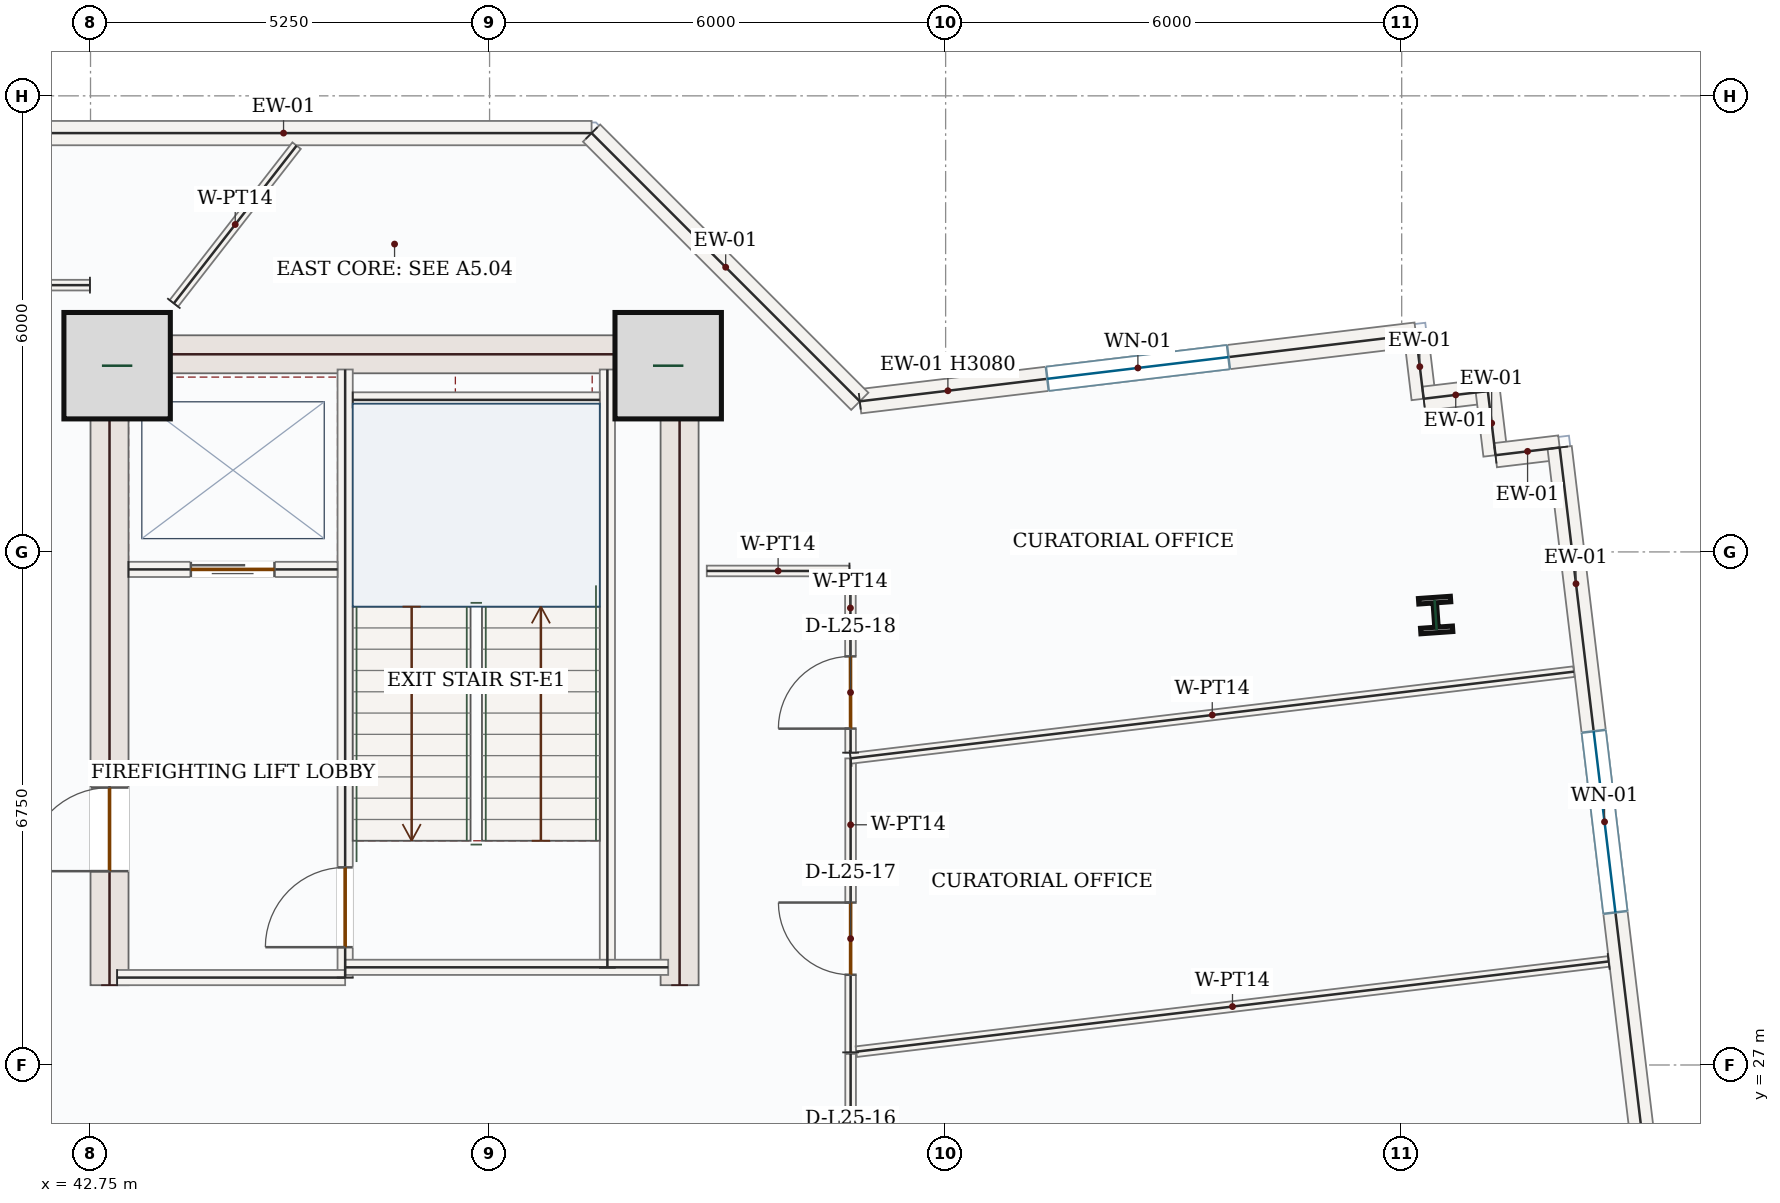
"""IFC4 building model, lengths in metres.
Left out: names, types, materials, properties, quantities, classifications, styles, units other than length and angle.
Written with IfcOpenShell. Run it as: python <this file> out.ifc"""

import sys

from ifc_helpers import new_model, si_unit, direction, frame, frame_2d, origin, origin_2d, place, context, subcontext, project, spatial, rectangle, i_section, extrude, source, transform, mapped, element, fill, save


model = new_model("IFC4")
c1 = context("Model", 3, precision=1e-05, world=origin(), true_north=direction((0.0, 1.0)))
c2 = subcontext(c1, "Body", "Model", "MODEL_VIEW")
j1 = project(units=[si_unit("LENGTHUNIT", "METRE"), si_unit("PLANEANGLEUNIT", "RADIAN")], contexts=[c1])
p1 = place(None, origin())
s1 = spatial("IfcSite", under=j1, at=p1, CompositionType="ELEMENT")
p2 = place(p1, origin())
s2 = spatial("IfcBuilding", under=s1, at=p2, CompositionType="ELEMENT")
p3 = place(p2, frame((0.0, 0.0, 113.1)))
s3 = spatial("IfcBuildingStorey", under=s2, at=p3, CompositionType="ELEMENT", Elevation=113.1)
p4 = place(p3, frame((43.0, 28.05, 0.0), z_axis=(0.0, 0.0, 1.0), x_axis=(0.0, 1.0, 0.0)))
e1 = element("IfcWall", 1, at=p4, inside=s3, PredefinedType="SHEAR", context=c2, shape_type="SweptSolid", body=[
    extrude(rectangle(XDim=8.55, YDim=0.5, at=frame_2d((4.275, 0.0))), origin(), (0.0, 0.0, 1.0), 3.95),
])
p5 = place(p4, frame((1.5, 0.0, 0.0)))
e2 = element("IfcOpeningElement", 2, at=p5, cuts=e1, PredefinedType="OPENING", context=c2, shape_type="SweptSolid", body=[
    extrude(rectangle(XDim=1.1, YDim=2.2, at=frame_2d((0.55, 1.1))), frame((0.0, 0.26, 0.0), z_axis=(0.0, -1.0, 0.0), x_axis=(1.0, 0.0, 0.0)), (0.0, 0.0, 1.0), 0.52),
])
m1 = source(origin(), c2, "Body", "SweptSolid", [
    extrude(rectangle(XDim=8.55, YDim=0.5, at=frame_2d((4.275, 0.0))), origin(), (0.0, 0.0, 1.0), 3.95),
])
p6 = place(p3, frame((50.5, 28.05, 0.0), z_axis=(0.0, 0.0, 1.0), x_axis=(0.0, 1.0, 0.0)))
e3 = element("IfcWall", 3, at=p6, inside=s3, PredefinedType="SHEAR", context=c2, shape_type="MappedRepresentation", body=[
    mapped(m1, transform((0.0, 0.0, 0.0), x_axis=(1.0, 0.0, 0.0), y_axis=(0.0, 1.0, 0.0), z_axis=(0.0, 0.0, 1.0), scale=1.0)),
])
m2 = source(origin(), c2, "Body", "SweptSolid", [
    extrude(rectangle(XDim=7.0, YDim=0.5, at=frame_2d((3.5, 0.0))), origin(), (0.0, 0.0, 1.0), 3.95),
])
p7 = place(p3, frame((43.25, 36.35, 0.0), z_axis=(0.0, 0.0, 1.0), x_axis=(1.0, 0.0, 0.0)))
e4 = element("IfcWall", 4, at=p7, inside=s3, PredefinedType="SHEAR", context=c2, shape_type="MappedRepresentation", body=[
    mapped(m2, transform((0.0, 0.0, 0.0), x_axis=(1.0, 0.0, 0.0), y_axis=(0.0, 1.0, 0.0), z_axis=(0.0, 0.0, 1.0), scale=1.0)),
])
m3 = source(origin(), c2, "Body", "SweptSolid", [
    extrude(rectangle(XDim=1.4, YDim=1.4, at=origin_2d()), origin(), (0.0, 0.0, 1.0), 4.2),
])
for number, where, z_axis, x_axis in (
    (5, (43.1, 36.2, 0.0), (0.0, 0.0, 1.0), (1.0, 0.0, 0.0)),
    (6, (50.35, 36.2, 0.0), (0.0, 0.0, 1.0), (1.0, 0.0, 0.0)),
):
    element("IfcColumn", number, at=place(p3, frame(where, z_axis=z_axis, x_axis=x_axis)), inside=s3, PredefinedType="COLUMN", context=c2, shape_type="MappedRepresentation", body=[
        mapped(m3, transform((0.0, 0.0, 0.0), x_axis=(1.0, 0.0, 0.0), y_axis=(0.0, 1.0, 0.0), z_axis=(0.0, 0.0, 1.0), scale=1.0)),
    ])
m4 = source(origin(), c2, "Body", "SweptSolid", [
    extrude(i_section(OverallWidth=0.421, OverallDepth=0.465, WebThickness=0.045, FlangeThickness=0.073, FilletRadius=0.018, at=origin_2d()), origin(), (0.0, 0.0, 1.0), 4.2),
])
p8 = place(p3, frame((60.447, 32.92, 0.0), z_axis=(0.0, 0.0, 1.0), x_axis=(0.99756405026, 0.069756473744, 0.0)))
e7 = element("IfcColumn", 7, at=p8, inside=s3, PredefinedType="COLUMN", context=c2, shape_type="MappedRepresentation", body=[
    mapped(m4, transform((0.0, 0.0, 0.0), x_axis=(1.0, 0.0, 0.0), y_axis=(0.0, 1.0, 0.0), z_axis=(0.0, 0.0, 1.0), scale=1.0)),
])
p9 = place(p3, frame((52.871, 35.731, 0.0), z_axis=(0.0, 0.0, 1.0), x_axis=(0.992882794037, 0.119095580547, 0.0)))
e8 = element("IfcWall", 8, at=p9, inside=s3, PredefinedType="SOLIDWALL", context=c2, shape_type="SweptSolid", body=[
    extrude(rectangle(XDim=7.37, YDim=0.32, at=frame_2d((3.685, 0.0))), origin(), (0.0, 0.0, 1.0), 3.08),
])
p10 = place(p9, frame((2.485, 0.0, 0.85)))
e9 = element("IfcOpeningElement", 9, at=p10, cuts=e8, PredefinedType="OPENING", context=c2, shape_type="SweptSolid", body=[
    extrude(rectangle(XDim=2.4, YDim=1.8, at=frame_2d((1.2, 0.9))), frame((0.0, 0.17, 0.0), z_axis=(0.0, -1.0, 0.0), x_axis=(1.0, 0.0, 0.0)), (0.0, 0.0, 1.0), 0.34),
])
m5 = source(origin(), c2, "Body", "SweptSolid", [
    extrude(rectangle(XDim=0.85, YDim=0.32, at=frame_2d((0.425, 0.0))), origin(), (0.0, 0.0, 1.0), 3.95),
])
for number, where, z_axis, x_axis in (
    (10, (60.188, 36.609, 0.0), (0.0, 0.0, 1.0), (0.119, -0.993, 0.0)),
    (11, (60.289, 35.765, 0.0), (0.0, 0.0, 1.0), (0.993, 0.119, 0.0)),
):
    element("IfcWall", number, at=place(p3, frame(where, z_axis=z_axis, x_axis=x_axis)), inside=s3, PredefinedType="SOLIDWALL", context=c2, shape_type="MappedRepresentation", body=[
        mapped(m5, transform((0.0, 0.0, 0.0), x_axis=(1.0, 0.0, 0.0), y_axis=(0.0, 1.0, 0.0), z_axis=(0.0, 0.0, 1.0), scale=1.0)),
    ])
m6 = source(origin(), c2, "Body", "SweptSolid", [
    extrude(rectangle(XDim=0.85, YDim=0.32, at=frame_2d((0.425, 0.0))), origin(), (0.0, 0.0, 1.0), 3.95),
])
p11 = place(p3, frame((61.133, 35.866, 0.0), z_axis=(0.0, 0.0, 1.0), x_axis=(0.11894130009, -0.992901287708, 0.0)))
e12 = element("IfcWall", 12, at=p11, inside=s3, PredefinedType="SOLIDWALL", context=c2, shape_type="MappedRepresentation", body=[
    mapped(m6, transform((0.0, 0.0, 0.0), x_axis=(1.0, 0.0, 0.0), y_axis=(0.0, 1.0, 0.0), z_axis=(0.0, 0.0, 1.0), scale=1.0)),
])
p12 = place(p3, frame((61.234, 35.022, 0.0), z_axis=(0.0, 0.0, 1.0), x_axis=(0.992905350382, 0.118907380694, 0.0)))
e13 = element("IfcWall", 13, at=p12, inside=s3, PredefinedType="SOLIDWALL", context=c2, shape_type="MappedRepresentation", body=[
    mapped(m5, transform((0.0, 0.0, 0.0), x_axis=(1.0, 0.0, 0.0), y_axis=(0.0, 1.0, 0.0), z_axis=(0.0, 0.0, 1.0), scale=1.0)),
])
p13 = place(p3, frame((62.078, 35.124, 0.0), z_axis=(0.0, 0.0, 1.0), x_axis=(0.119092815244, -0.992883125729, 0.0)))
e14 = element("IfcWall", 14, at=p13, inside=s3, PredefinedType="SOLIDWALL", context=c2, shape_type="SweptSolid", body=[
    extrude(rectangle(XDim=9.92, YDim=0.32, at=frame_2d((4.96, 0.0))), origin(), (0.0, 0.0, 1.0), 3.95),
])
p14 = place(p13, frame((3.76, 0.0, 0.85)))
e15 = element("IfcOpeningElement", 15, at=p14, cuts=e14, PredefinedType="OPENING", context=c2, shape_type="SweptSolid", body=[
    extrude(rectangle(XDim=2.4, YDim=1.8, at=frame_2d((1.2, 0.9))), frame((0.0, 0.17, 0.0), z_axis=(0.0, -1.0, 0.0), x_axis=(1.0, 0.0, 0.0)), (0.0, 0.0, 1.0), 0.34),
])
m7 = source(origin(), c2, "Body", "SweptSolid", [
    extrude(rectangle(XDim=8.105, YDim=0.32, at=frame_2d((4.052, 0.0))), origin(), (0.0, 0.0, 1.0), 3.95),
])
p15 = place(p3, frame((41.237, 39.26, 0.0), z_axis=(0.0, 0.0, 1.0), x_axis=(1.0, 0.0, 0.0)))
e16 = element("IfcWall", 16, at=p15, inside=s3, PredefinedType="SOLIDWALL", context=c2, shape_type="MappedRepresentation", body=[
    mapped(m7, transform((0.0, 0.0, 0.0), x_axis=(1.0, 0.0, 0.0), y_axis=(0.0, 1.0, 0.0), z_axis=(0.0, 0.0, 1.0), scale=1.0)),
])
m8 = source(origin(), c2, "Body", "SweptSolid", [
    extrude(rectangle(XDim=4.99, YDim=0.32, at=frame_2d((2.495, 0.0))), origin(), (0.0, 0.0, 1.0), 3.95),
])
p16 = place(p3, frame((49.342, 39.26, 0.0), z_axis=(0.0, 0.0, 1.0), x_axis=(0.707106781187, -0.707106781187, 0.0)))
e17 = element("IfcWall", 17, at=p16, inside=s3, PredefinedType="SOLIDWALL", context=c2, shape_type="MappedRepresentation", body=[
    mapped(m8, transform((0.0, 0.0, 0.0), x_axis=(1.0, 0.0, 0.0), y_axis=(0.0, 1.0, 0.0), z_axis=(0.0, 0.0, 1.0), scale=1.0)),
])
m9 = source(origin(), c2, "Body", "SweptSolid", [
    extrude(rectangle(XDim=7.87, YDim=0.2, at=frame_2d((3.935, 0.0))), origin(), (0.0, 0.0, 1.0), 3.95),
])
p17 = place(p3, frame((49.55, 28.28, 0.0), z_axis=(0.0, 0.0, 1.0), x_axis=(0.0, 1.0, 0.0)))
e18 = element("IfcWall", 18, at=p17, inside=s3, PredefinedType="SOLIDWALL", context=c2, shape_type="MappedRepresentation", body=[
    mapped(m9, transform((0.0, 0.0, 0.0), x_axis=(1.0, 0.0, 0.0), y_axis=(0.0, 1.0, 0.0), z_axis=(0.0, 0.0, 1.0), scale=1.0)),
])
p18 = place(p3, frame((46.1, 28.15, 0.0), z_axis=(0.0, 0.0, 1.0), x_axis=(0.0, 1.0, 0.0)))
e19 = element("IfcWall", 19, at=p18, inside=s3, PredefinedType="SOLIDWALL", context=c2, shape_type="SweptSolid", body=[
    extrude(rectangle(XDim=8.0, YDim=0.2, at=frame_2d((4.0, 0.0))), origin(), (0.0, 0.0, 1.0), 3.95),
])
p19 = place(p18, frame((0.4, 0.0, 0.0)))
e20 = element("IfcOpeningElement", 20, at=p19, cuts=e19, PredefinedType="OPENING", context=c2, shape_type="SweptSolid", body=[
    extrude(rectangle(XDim=1.05, YDim=2.15, at=frame_2d((0.525, 1.075))), frame((0.0, 0.11, 0.0), z_axis=(0.0, -1.0, 0.0), x_axis=(1.0, 0.0, 0.0)), (0.0, 0.0, 1.0), 0.22),
])
m10 = source(origin(), c2, "Body", "SweptSolid", [
    extrude(rectangle(XDim=3.0, YDim=0.2, at=frame_2d((1.5, 0.0))), origin(), (0.0, 0.0, 1.0), 3.95),
])
p20 = place(p3, frame((43.1, 28.15, 0.0), z_axis=(0.0, 0.0, 1.0), x_axis=(1.0, 0.0, 0.0)))
e21 = element("IfcWall", 21, at=p20, inside=s3, PredefinedType="SOLIDWALL", context=c2, shape_type="MappedRepresentation", body=[
    mapped(m10, transform((0.0, 0.0, 0.0), x_axis=(1.0, 0.0, 0.0), y_axis=(0.0, 1.0, 0.0), z_axis=(0.0, 0.0, 1.0), scale=1.0)),
])
m11 = source(origin(), c2, "Body", "SweptSolid", [
    extrude(rectangle(XDim=4.25, YDim=0.2, at=frame_2d((2.125, 0.0))), origin(), (0.0, 0.0, 1.0), 3.95),
])
p21 = place(p3, frame((46.1, 28.285, 0.0), z_axis=(0.0, 0.0, 1.0), x_axis=(1.0, 0.0, 0.0)))
e22 = element("IfcWall", 22, at=p21, inside=s3, PredefinedType="SOLIDWALL", context=c2, shape_type="MappedRepresentation", body=[
    mapped(m11, transform((0.0, 0.0, 0.0), x_axis=(1.0, 0.0, 0.0), y_axis=(0.0, 1.0, 0.0), z_axis=(0.0, 0.0, 1.0), scale=1.0)),
])
m12 = source(origin(), c2, "Body", "SweptSolid", [
    extrude(rectangle(XDim=3.25, YDim=0.2, at=frame_2d((1.625, 0.0))), origin(), (0.0, 0.0, 1.0), 3.95),
])
p22 = place(p3, frame((46.2, 35.75, 0.0), z_axis=(0.0, 0.0, 1.0), x_axis=(1.0, 0.0, 0.0)))
e23 = element("IfcWall", 23, at=p22, inside=s3, PredefinedType="SOLIDWALL", context=c2, shape_type="MappedRepresentation", body=[
    mapped(m12, transform((0.0, 0.0, 0.0), x_axis=(1.0, 0.0, 0.0), y_axis=(0.0, 1.0, 0.0), z_axis=(0.0, 0.0, 1.0), scale=1.0)),
])
p23 = place(p3, frame((43.25, 33.52, 0.0), z_axis=(0.0, 0.0, 1.0), x_axis=(1.0, 0.0, 0.0)))
e24 = element("IfcWall", 24, at=p23, inside=s3, PredefinedType="SOLIDWALL", context=c2, shape_type="SweptSolid", body=[
    extrude(rectangle(XDim=2.75, YDim=0.2, at=frame_2d((1.375, 0.0))), origin(), (0.0, 0.0, 1.0), 3.95),
])
p24 = place(p23, frame((0.82, 0.0, 0.0)))
e25 = element("IfcOpeningElement", 25, at=p24, cuts=e24, PredefinedType="OPENING", context=c2, shape_type="SweptSolid", body=[
    extrude(rectangle(XDim=1.1, YDim=2.15, at=frame_2d((0.55, 1.075))), frame((0.0, 0.11, 0.0), z_axis=(0.0, -1.0, 0.0), x_axis=(1.0, 0.0, 0.0)), (0.0, 0.0, 1.0), 0.22),
])
p25 = place(p3, frame((52.75, 27.166, 0.0), z_axis=(0.0, 0.0, 1.0), x_axis=(0.0, 1.0, 0.0)))
e26 = element("IfcWall", 26, at=p25, inside=s3, PredefinedType="PARTITIONING", context=c2, shape_type="SweptSolid", body=[
    extrude(rectangle(XDim=3.868, YDim=0.14, at=frame_2d((1.934, 0.0))), origin(), (0.0, 0.0, 1.0), 3.95),
])
p26 = place(p25, frame((1.021, 0.0, 0.0)))
e27 = element("IfcOpeningElement", 27, at=p26, cuts=e26, PredefinedType="OPENING", context=c2, shape_type="SweptSolid", body=[
    extrude(rectangle(XDim=0.95, YDim=2.15, at=frame_2d((0.475, 1.075))), frame((0.0, 0.08, 0.0), z_axis=(0.0, -1.0, 0.0), x_axis=(1.0, 0.0, 0.0)), (0.0, 0.0, 1.0), 0.16),
])
m13 = source(origin(), c2, "Body", "SweptSolid", [
    extrude(rectangle(XDim=9.584, YDim=0.14, at=frame_2d((4.792, 0.0))), origin(), (0.0, 0.0, 1.0), 3.95),
])
p27 = place(p3, frame((52.75, 31.034, 0.0), z_axis=(0.0, 0.0, 1.0), x_axis=(0.992883225705, 0.119091981737, 0.0)))
e28 = element("IfcWall", 28, at=p27, inside=s3, PredefinedType="PARTITIONING", context=c2, shape_type="MappedRepresentation", body=[
    mapped(m13, transform((0.0, 0.0, 0.0), x_axis=(1.0, 0.0, 0.0), y_axis=(0.0, 1.0, 0.0), z_axis=(0.0, 0.0, 1.0), scale=1.0)),
])
m14 = source(origin(), c2, "Body", "SweptSolid", [
    extrude(rectangle(XDim=9.969, YDim=0.14, at=frame_2d((4.984, 0.0))), origin(), (0.0, 0.0, 1.0), 3.95),
])
p28 = place(p3, frame((62.723, 28.362, 0.0), z_axis=(0.0, 0.0, 1.0), x_axis=(-0.992882747367, -0.119095969623, 0.0)))
e29 = element("IfcWall", 29, at=p28, inside=s3, PredefinedType="PARTITIONING", context=c2, shape_type="MappedRepresentation", body=[
    mapped(m14, transform((0.0, 0.0, 0.0), x_axis=(1.0, 0.0, 0.0), y_axis=(0.0, 1.0, 0.0), z_axis=(0.0, 0.0, 1.0), scale=1.0)),
])
p29 = place(p3, frame((52.75, 20.575, 0.0), z_axis=(0.0, 0.0, 1.0), x_axis=(0.0, 1.0, 0.0)))
e30 = element("IfcWall", 30, at=p29, inside=s3, PredefinedType="PARTITIONING", context=c2, shape_type="SweptSolid", body=[
    extrude(rectangle(XDim=6.571, YDim=0.14, at=frame_2d((3.285, 0.0))), origin(), (0.0, 0.0, 1.0), 3.95),
])
p30 = place(p29, frame((4.384, 0.0, 0.0)))
e31 = element("IfcOpeningElement", 31, at=p30, cuts=e30, PredefinedType="OPENING", context=c2, shape_type="SweptSolid", body=[
    extrude(rectangle(XDim=0.95, YDim=2.15, at=frame_2d((0.475, 1.075))), frame((0.0, 0.08, 0.0), z_axis=(0.0, -1.0, 0.0), x_axis=(1.0, 0.0, 0.0)), (0.0, 0.0, 1.0), 0.16),
])
m15 = source(origin(), c2, "Body", "SweptSolid", [
    extrude(rectangle(XDim=2.629, YDim=0.14, at=frame_2d((1.315, 0.0))), origin(), (0.0, 0.0, 1.0), 3.95),
])
p31 = place(p3, frame((43.846, 37.02, 0.0), z_axis=(0.0, 0.0, 1.0), x_axis=(0.614210560268, 0.789142184689, 0.0)))
e32 = element("IfcWall", 32, at=p31, inside=s3, PredefinedType="PARTITIONING", context=c2, shape_type="MappedRepresentation", body=[
    mapped(m15, transform((0.0, 0.0, 0.0), x_axis=(1.0, 0.0, 0.0), y_axis=(0.0, 1.0, 0.0), z_axis=(0.0, 0.0, 1.0), scale=1.0)),
])
p32 = place(p3, frame((52.75, 31.109, 0.0), z_axis=(0.0, 0.0, 1.0), x_axis=(-0.001430175266, 0.999998977299, 0.0)))
e33 = element("IfcWall", 33, at=p32, inside=s3, PredefinedType="PARTITIONING", context=c2, shape_type="SweptSolid", body=[
    extrude(rectangle(XDim=2.39, YDim=0.14, at=frame_2d((1.195, 0.0))), origin(), (0.0, 0.0, 1.0), 3.95),
])
p33 = place(p32, frame((0.317, 0.0, 0.0)))
e34 = element("IfcOpeningElement", 34, at=p33, cuts=e33, PredefinedType="OPENING", context=c2, shape_type="SweptSolid", body=[
    extrude(rectangle(XDim=0.95, YDim=2.15, at=frame_2d((0.475, 1.075))), frame((0.0, 0.08, 0.0), z_axis=(0.0, -1.0, 0.0), x_axis=(1.0, 0.0, 0.0)), (0.0, 0.0, 1.0), 0.16),
])
m16 = source(origin(), c2, "Body", "SweptSolid", [
    extrude(rectangle(XDim=1.877, YDim=0.14, at=frame_2d((0.938, 0.0))), origin(), (0.0, 0.0, 1.0), 3.95),
])
p34 = place(p3, frame((52.735, 33.499, 0.0), z_axis=(0.0, 0.0, 1.0), x_axis=(-0.999999923865, 0.000390218493, 0.0)))
e35 = element("IfcWall", 35, at=p34, inside=s3, PredefinedType="PARTITIONING", context=c2, shape_type="MappedRepresentation", body=[
    mapped(m16, transform((0.0, 0.0, 0.0), x_axis=(1.0, 0.0, 0.0), y_axis=(0.0, 1.0, 0.0), z_axis=(0.0, 0.0, 1.0), scale=1.0)),
])
p35 = place(p3, frame((42.742, 37.26, 0.0), z_axis=(0.0, 0.0, 1.0), x_axis=(-0.999999999614, 2.7778549e-05, 0.0)))
e36 = element("IfcWall", 36, at=p35, inside=s3, PredefinedType="PARTITIONING", context=c2, shape_type="SweptSolid", body=[
    extrude(rectangle(XDim=8.789, YDim=0.14, at=frame_2d((4.395, 0.0))), origin(), (0.0, 0.0, 1.0), 3.95),
])
p36 = place(p35, frame((6.114, 0.0, 0.0)))
e37 = element("IfcOpeningElement", 37, at=p36, cuts=e36, PredefinedType="OPENING", context=c2, shape_type="SweptSolid", body=[
    extrude(rectangle(XDim=0.95, YDim=2.15, at=frame_2d((0.475, 1.075))), frame((0.0, 0.08, 0.0), z_axis=(0.0, -1.0, 0.0), x_axis=(1.0, 0.0, 0.0)), (0.0, 0.0, 1.0), 0.16),
])
m17 = source(origin(), c2, "Body", "SweptSolid", [
    extrude(rectangle(XDim=2.4, YDim=1.8, at=frame_2d((1.2, 0.9))), frame((0.0, 0.03, 0.0), z_axis=(0.0, -1.0, 0.0), x_axis=(1.0, 0.0, 0.0)), (0.0, 0.0, 1.0), 0.06),
])
p37 = place(p10, origin())
e38 = element("IfcWindow", 38, at=p37, inside=s3, PartitioningType="DOUBLE_PANEL_VERTICAL", PredefinedType="WINDOW", context=c2, shape_type="MappedRepresentation", body=[
    mapped(m17, transform((0.0, 0.0, 0.0), x_axis=(1.0, 0.0, 0.0), y_axis=(0.0, 1.0, 0.0), z_axis=(0.0, 0.0, 1.0), scale=1.0)),
])
fill(e9, e38)
p38 = place(p14, origin())
e39 = element("IfcWindow", 39, at=p38, inside=s3, PartitioningType="DOUBLE_PANEL_VERTICAL", PredefinedType="WINDOW", context=c2, shape_type="MappedRepresentation", body=[
    mapped(m17, transform((0.0, 0.0, 0.0), x_axis=(1.0, 0.0, 0.0), y_axis=(0.0, 1.0, 0.0), z_axis=(0.0, 0.0, 1.0), scale=1.0)),
])
fill(e15, e39)
m18 = source(origin(), c2, "Body", "SweptSolid", [
    extrude(rectangle(XDim=1.05, YDim=2.15, at=frame_2d((0.525, 1.075))), frame((0.0, 0.025, 0.0), z_axis=(0.0, -1.0, 0.0), x_axis=(1.0, 0.0, 0.0)), (0.0, 0.0, 1.0), 0.05),
])
p39 = place(p19, origin())
e40 = element("IfcDoor", 40, at=p39, inside=s3, OperationType="SINGLE_SWING_LEFT", PredefinedType="DOOR", context=c2, shape_type="MappedRepresentation", body=[
    mapped(m18, transform((0.0, 0.0, 0.0), x_axis=(1.0, 0.0, 0.0), y_axis=(0.0, 1.0, 0.0), z_axis=(0.0, 0.0, 1.0), scale=1.0)),
])
fill(e20, e40)
m19 = source(origin(), c2, "Body", "SweptSolid", [
    extrude(rectangle(XDim=1.1, YDim=2.15, at=frame_2d((0.55, 1.075))), frame((0.0, 0.025, 0.0), z_axis=(0.0, -1.0, 0.0), x_axis=(1.0, 0.0, 0.0)), (0.0, 0.0, 1.0), 0.05),
])
p40 = place(p24, origin())
e41 = element("IfcDoor", 41, at=p40, inside=s3, OperationType="DOUBLE_DOOR_SLIDING", PredefinedType="DOOR", context=c2, shape_type="MappedRepresentation", body=[
    mapped(m19, transform((0.0, 0.0, 0.0), x_axis=(1.0, 0.0, 0.0), y_axis=(0.0, 1.0, 0.0), z_axis=(0.0, 0.0, 1.0), scale=1.0)),
])
fill(e25, e41)
m20 = source(origin(), c2, "Body", "SweptSolid", [
    extrude(rectangle(XDim=1.1, YDim=2.2, at=frame_2d((0.55, 1.1))), frame((0.0, 0.025, 0.0), z_axis=(0.0, -1.0, 0.0), x_axis=(1.0, 0.0, 0.0)), (0.0, 0.0, 1.0), 0.05),
])
p41 = place(p5, origin())
e42 = element("IfcDoor", 42, at=p41, inside=s3, OperationType="SINGLE_SWING_LEFT", PredefinedType="DOOR", context=c2, shape_type="MappedRepresentation", body=[
    mapped(m20, transform((0.0, 0.0, 0.0), x_axis=(1.0, 0.0, 0.0), y_axis=(0.0, 1.0, 0.0), z_axis=(0.0, 0.0, 1.0), scale=1.0)),
])
fill(e2, e42)
m21 = source(origin(), c2, "Body", "SweptSolid", [
    extrude(rectangle(XDim=0.95, YDim=2.15, at=frame_2d((0.475, 1.075))), frame((0.0, 0.025, 0.0), z_axis=(0.0, -1.0, 0.0), x_axis=(1.0, 0.0, 0.0)), (0.0, 0.0, 1.0), 0.05),
])
p42 = place(p26, origin())
e43 = element("IfcDoor", 43, at=p42, inside=s3, OperationType="SINGLE_SWING_RIGHT", PredefinedType="DOOR", context=c2, shape_type="MappedRepresentation", body=[
    mapped(m21, transform((0.0, 0.0, 0.0), x_axis=(1.0, 0.0, 0.0), y_axis=(0.0, 1.0, 0.0), z_axis=(0.0, 0.0, 1.0), scale=1.0)),
])
fill(e27, e43)
p43 = place(p33, origin())
e44 = element("IfcDoor", 44, at=p43, inside=s3, OperationType="SINGLE_SWING_LEFT", PredefinedType="DOOR", context=c2, shape_type="MappedRepresentation", body=[
    mapped(m21, transform((0.0, 0.0, 0.0), x_axis=(1.0, 0.0, 0.0), y_axis=(0.0, 1.0, 0.0), z_axis=(0.0, 0.0, 1.0), scale=1.0)),
])
fill(e34, e44)
save(model, sys.argv[1])
